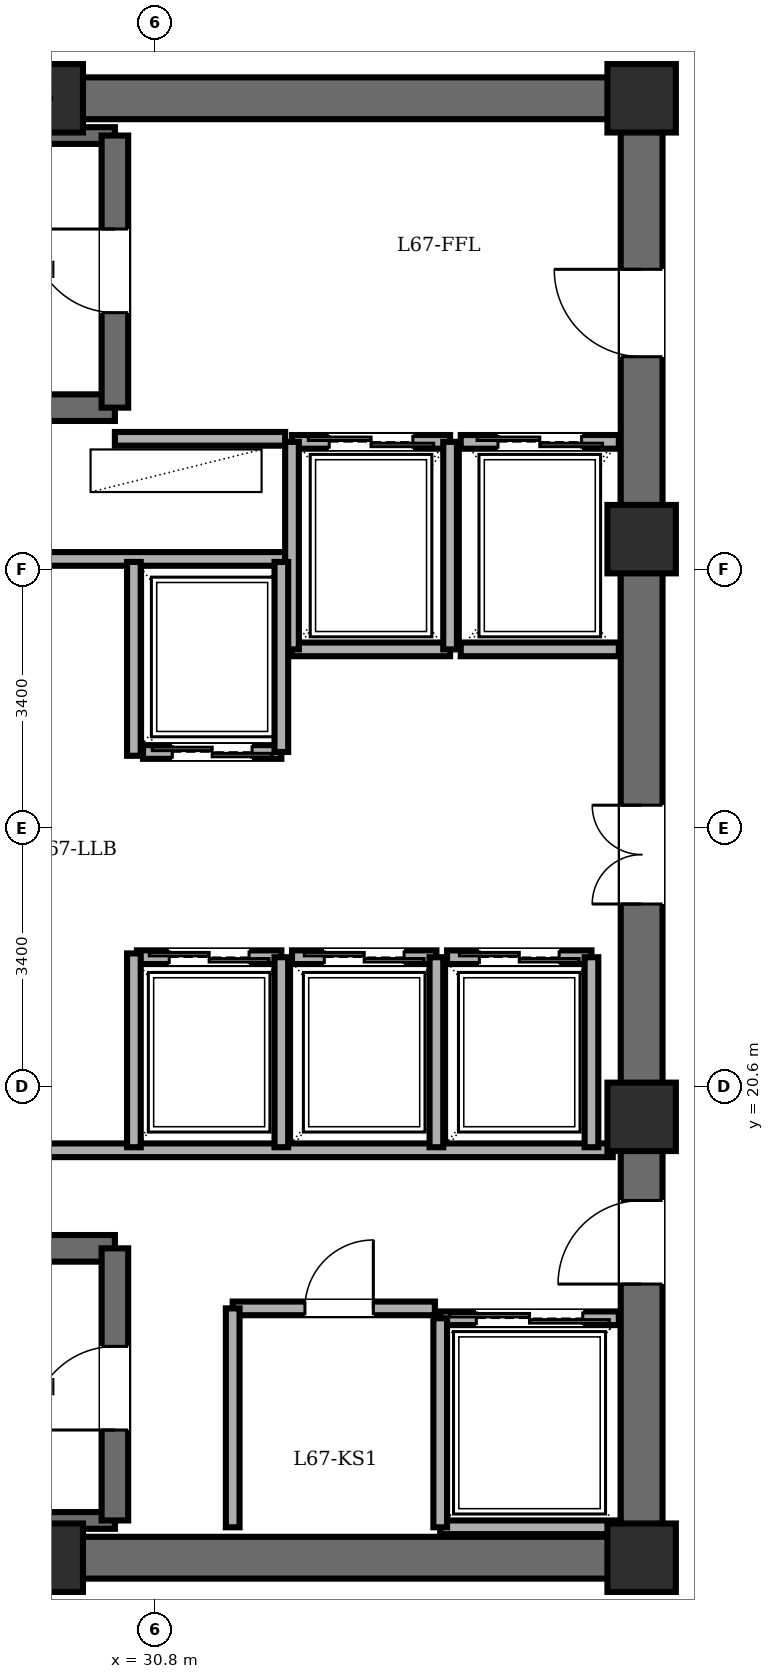
"""IFC4 building model, lengths in metres.
Left out: names, types, materials, properties, quantities, classifications, styles, units other than length and angle.
Written with IfcOpenShell. Run it as: python <this file> out.ifc"""

import sys

from ifc_helpers import new_model, si_unit, direction, frame, frame_2d, origin, origin_2d, place, context, subcontext, project, spatial, rectangle, extrude, element, fill, save


model = new_model("IFC4")
c1 = context("Model", 3, precision=1e-05, world=origin(), true_north=direction((0.0, 1.0)))
c2 = subcontext(c1, "Body", "Model", "MODEL_VIEW")
j1 = project(units=[si_unit("LENGTHUNIT", "METRE"), si_unit("PLANEANGLEUNIT", "RADIAN")], contexts=[c1])
p1 = place(None, origin())
s1 = spatial("IfcSite", under=j1, at=p1, CompositionType="ELEMENT")
p2 = place(p1, origin())
s2 = spatial("IfcBuilding", under=s1, at=p2, CompositionType="ELEMENT")
p3 = place(p2, frame((0.0, 0.0, 258.8)))
s3 = spatial("IfcBuildingStorey", under=s2, at=p3, CompositionType="ELEMENT", Elevation=258.8)
for number, where, z_axis, x_axis in (
    (1, (29.4, 14.4, 0.0), (0.0, 0.0, 1.0), (1.0, 0.0, 0.0)),
    (2, (37.2, 14.4, 0.0), (0.0, 0.0, 1.0), (1.0, 0.0, 0.0)),
    (3, (37.2, 20.2, 0.0), (0.0, 0.0, 1.0), (1.0, 0.0, 0.0)),
    (4, (37.2, 27.8, 0.0), (0.0, 0.0, 1.0), (1.0, 0.0, 0.0)),
    (5, (37.2, 33.6, 0.0), (0.0, 0.0, 1.0), (1.0, 0.0, 0.0)),
    (6, (29.4, 33.6, 0.0), (0.0, 0.0, 1.0), (1.0, 0.0, 0.0)),
):
    element("IfcColumn", number, at=place(p3, frame(where, z_axis=z_axis, x_axis=x_axis)), inside=s3, PredefinedType="COLUMN", context=c2, shape_type="SweptSolid", body=[
        extrude(rectangle(XDim=0.9, YDim=0.9, at=origin_2d()), origin(), (0.0, 0.0, 1.0), 3.65),
    ])
for number, where, z_axis, x_axis in (
    (7, (21.6, 33.6, 0.0), (0.0, 0.0, 1.0), (1.0, 0.0, 0.0)),
    (8, (37.2, 14.4, 0.0), (0.0, 0.0, 1.0), (-1.0, 0.0, 0.0)),
):
    element("IfcWall", number, at=place(p3, frame(where, z_axis=z_axis, x_axis=x_axis)), inside=s3, PredefinedType="SHEAR", context=c2, shape_type="SweptSolid", body=[
        extrude(rectangle(XDim=15.6, YDim=0.55, at=frame_2d((7.8, 0.0))), origin(), (0.0, 0.0, 1.0), 3.45),
    ])
p4 = place(p3, frame((37.2, 14.4, 0.0), z_axis=(0.0, 0.0, 1.0), x_axis=(0.0, 1.0, 0.0)))
e9 = element("IfcWall", 9, at=p4, inside=s3, PredefinedType="SHEAR", context=c2, shape_type="SweptSolid", body=[
    extrude(rectangle(XDim=19.2, YDim=0.55, at=frame_2d((9.6, 0.0))), origin(), (0.0, 0.0, 1.0), 3.45),
])
p5 = place(p4, frame((15.8, 0.0, 0.0)))
e10 = element("IfcOpeningElement", 10, at=p5, cuts=e9, PredefinedType="OPENING", context=c2, shape_type="SweptSolid", body=[
    extrude(rectangle(XDim=1.15, YDim=2.15, at=frame_2d((0.575, 1.075))), frame((0.0, 0.285, 0.0), z_axis=(0.0, -1.0, 0.0), x_axis=(1.0, 0.0, 0.0)), (0.0, 0.0, 1.0), 0.57),
])
p6 = place(p4, frame((3.6, 0.0, 0.0)))
e11 = element("IfcOpeningElement", 11, at=p6, cuts=e9, PredefinedType="OPENING", context=c2, shape_type="SweptSolid", body=[
    extrude(rectangle(XDim=1.1, YDim=2.15, at=frame_2d((0.55, 1.075))), frame((0.0, 0.285, 0.0), z_axis=(0.0, -1.0, 0.0), x_axis=(1.0, 0.0, 0.0)), (0.0, 0.0, 1.0), 0.57),
])
p7 = place(p4, frame((8.6, 0.0, 0.0)))
e12 = element("IfcOpeningElement", 12, at=p7, cuts=e9, PredefinedType="OPENING", context=c2, shape_type="SweptSolid", body=[
    extrude(rectangle(XDim=1.3, YDim=2.2, at=frame_2d((0.65, 1.1))), frame((0.0, 0.285, 0.0), z_axis=(0.0, -1.0, 0.0), x_axis=(1.0, 0.0, 0.0)), (0.0, 0.0, 1.0), 0.57),
])
p8 = place(p3, frame((22.48, 29.53, 0.0), z_axis=(0.0, 0.0, 1.0), x_axis=(1.0, 0.0, 0.0)))
e13 = element("IfcWall", 13, at=p8, inside=s3, PredefinedType="SOLIDWALL", context=c2, shape_type="SweptSolid", body=[
    extrude(rectangle(XDim=7.79, YDim=0.35, at=frame_2d((3.895, 0.0))), origin(), (0.0, 0.0, 1.0), 3.45),
])
p9 = place(p3, frame((22.48, 33.11, 0.0), z_axis=(0.0, 0.0, 1.0), x_axis=(1.0, 0.0, 0.0)))
e14 = element("IfcWall", 14, at=p9, inside=s3, PredefinedType="PARTITIONING", context=c2, shape_type="SweptSolid", body=[
    extrude(rectangle(XDim=7.79, YDim=0.22, at=frame_2d((3.895, 0.0))), origin(), (0.0, 0.0, 1.0), 3.45),
])
p10 = place(p3, frame((30.27, 29.53, 0.0), z_axis=(0.0, 0.0, 1.0), x_axis=(0.0, 1.0, 0.0)))
e15 = element("IfcWall", 15, at=p10, inside=s3, PredefinedType="SOLIDWALL", context=c2, shape_type="SweptSolid", body=[
    extrude(rectangle(XDim=3.58, YDim=0.35, at=frame_2d((1.79, 0.0))), origin(), (0.0, 0.0, 1.0), 3.45),
])
p11 = place(p10, frame((1.25, 0.0, 0.0)))
e16 = element("IfcOpeningElement", 16, at=p11, cuts=e15, PredefinedType="OPENING", context=c2, shape_type="SweptSolid", body=[
    extrude(rectangle(XDim=1.1, YDim=2.15, at=frame_2d((0.55, 1.075))), frame((0.0, 0.185, 0.0), z_axis=(0.0, -1.0, 0.0), x_axis=(1.0, 0.0, 0.0)), (0.0, 0.0, 1.0), 0.37),
])
p12 = place(p3, frame((22.48, 18.47, 0.0), z_axis=(0.0, 0.0, 1.0), x_axis=(1.0, 0.0, 0.0)))
e17 = element("IfcWall", 17, at=p12, inside=s3, PredefinedType="SOLIDWALL", context=c2, shape_type="SweptSolid", body=[
    extrude(rectangle(XDim=7.79, YDim=0.35, at=frame_2d((3.895, 0.0))), origin(), (0.0, 0.0, 1.0), 3.45),
])
p13 = place(p3, frame((22.48, 14.89, 0.0), z_axis=(0.0, 0.0, 1.0), x_axis=(1.0, 0.0, 0.0)))
e18 = element("IfcWall", 18, at=p13, inside=s3, PredefinedType="PARTITIONING", context=c2, shape_type="SweptSolid", body=[
    extrude(rectangle(XDim=7.79, YDim=0.22, at=frame_2d((3.895, 0.0))), origin(), (0.0, 0.0, 1.0), 3.45),
])
p14 = place(p3, frame((30.27, 14.89, 0.0), z_axis=(0.0, 0.0, 1.0), x_axis=(0.0, 1.0, 0.0)))
e19 = element("IfcWall", 19, at=p14, inside=s3, PredefinedType="SOLIDWALL", context=c2, shape_type="SweptSolid", body=[
    extrude(rectangle(XDim=3.58, YDim=0.35, at=frame_2d((1.79, 0.0))), origin(), (0.0, 0.0, 1.0), 3.45),
])
p15 = place(p14, frame((1.19, 0.0, 0.0)))
e20 = element("IfcOpeningElement", 20, at=p15, cuts=e19, PredefinedType="OPENING", context=c2, shape_type="SweptSolid", body=[
    extrude(rectangle(XDim=1.1, YDim=2.15, at=frame_2d((0.55, 1.075))), frame((0.0, 0.185, 0.0), z_axis=(0.0, -1.0, 0.0), x_axis=(1.0, 0.0, 0.0)), (0.0, 0.0, 1.0), 0.37),
])
p16 = place(p3, frame((30.27, 29.12, 0.0), z_axis=(0.0, 0.0, 1.0), x_axis=(1.0, 0.0, 0.0)))
e21 = element("IfcWall", 21, at=p16, inside=s3, PredefinedType="PARTITIONING", context=c2, shape_type="SweptSolid", body=[
    extrude(rectangle(XDim=2.24, YDim=0.18, at=frame_2d((1.12, 0.0))), origin(), (0.0, 0.0, 1.0), 3.45),
])
p17 = place(p3, frame((21.95, 27.54, 0.0), z_axis=(0.0, 0.0, 1.0), x_axis=(1.0, 0.0, 0.0)))
e22 = element("IfcWall", 22, at=p17, inside=s3, PredefinedType="PARTITIONING", context=c2, shape_type="SweptSolid", body=[
    extrude(rectangle(XDim=10.56, YDim=0.18, at=frame_2d((5.28, 0.0))), origin(), (0.0, 0.0, 1.0), 3.45),
])
p18 = place(p3, frame((21.95, 19.76, 0.0), z_axis=(0.0, 0.0, 1.0), x_axis=(1.0, 0.0, 0.0)))
e23 = element("IfcWall", 23, at=p18, inside=s3, PredefinedType="PARTITIONING", context=c2, shape_type="SweptSolid", body=[
    extrude(rectangle(XDim=14.87, YDim=0.18, at=frame_2d((7.435, 0.0))), origin(), (0.0, 0.0, 1.0), 3.45),
])
p19 = place(p3, frame((31.82, 17.68, 0.0), z_axis=(0.0, 0.0, 1.0), x_axis=(1.0, 0.0, 0.0)))
e24 = element("IfcWall", 24, at=p19, inside=s3, PredefinedType="PARTITIONING", context=c2, shape_type="SweptSolid", body=[
    extrude(rectangle(XDim=2.66, YDim=0.18, at=frame_2d((1.33, 0.0))), origin(), (0.0, 0.0, 1.0), 3.45),
])
p20 = place(p19, frame((0.95, 0.0, 0.0)))
e25 = element("IfcOpeningElement", 25, at=p20, cuts=e24, PredefinedType="OPENING", context=c2, shape_type="SweptSolid", body=[
    extrude(rectangle(XDim=0.9, YDim=2.05, at=frame_2d((0.45, 1.025))), frame((0.0, 0.1, 0.0), z_axis=(0.0, -1.0, 0.0), x_axis=(1.0, 0.0, 0.0)), (0.0, 0.0, 1.0), 0.2),
])
p21 = place(p3, frame((31.82, 14.8, 0.0), z_axis=(0.0, 0.0, 1.0), x_axis=(0.0, 1.0, 0.0)))
e26 = element("IfcWall", 26, at=p21, inside=s3, PredefinedType="PARTITIONING", context=c2, shape_type="SweptSolid", body=[
    extrude(rectangle(XDim=2.88, YDim=0.18, at=frame_2d((1.44, 0.0))), origin(), (0.0, 0.0, 1.0), 3.45),
])
p22 = place(p3, frame((32.6, 29.08, 0.0), z_axis=(0.0, 0.0, 1.0), x_axis=(1.0, 0.0, 0.0)))
e27 = element("IfcWall", 27, at=p22, inside=s3, PredefinedType="PARTITIONING", context=c2, shape_type="SweptSolid", body=[
    extrude(rectangle(XDim=2.08, YDim=0.18, at=frame_2d((1.04, 0.0))), origin(), (0.0, 0.0, 1.0), 3.45),
])
p23 = place(p22, frame((0.49, 0.0, 0.0)))
e28 = element("IfcOpeningElement", 28, at=p23, cuts=e27, PredefinedType="OPENING", context=c2, shape_type="SweptSolid", body=[
    extrude(rectangle(XDim=1.1, YDim=2.2, at=frame_2d((0.55, 1.1))), frame((0.0, 0.1, 0.0), z_axis=(0.0, -1.0, 0.0), x_axis=(1.0, 0.0, 0.0)), (0.0, 0.0, 1.0), 0.2),
])
p24 = place(p3, frame((34.68, 26.35, 0.0), z_axis=(0.0, 0.0, 1.0), x_axis=(-1.0, 0.0, 0.0)))
e29 = element("IfcWall", 29, at=p24, inside=s3, PredefinedType="PARTITIONING", context=c2, shape_type="SweptSolid", body=[
    extrude(rectangle(XDim=2.08, YDim=0.18, at=frame_2d((1.04, 0.0))), origin(), (0.0, 0.0, 1.0), 3.45),
])
for number, where, z_axis, x_axis in (
    (30, (34.68, 26.35, 0.0), (0.0, 0.0, 1.0), (0.0, 1.0, 0.0)),
    (31, (32.6, 29.08, 0.0), (0.0, 0.0, 1.0), (0.0, -1.0, 0.0)),
):
    element("IfcWall", number, at=place(p3, frame(where, z_axis=z_axis, x_axis=x_axis)), inside=s3, PredefinedType="PARTITIONING", context=c2, shape_type="SweptSolid", body=[
        extrude(rectangle(XDim=2.73, YDim=0.18, at=frame_2d((1.365, 0.0))), origin(), (0.0, 0.0, 1.0), 3.45),
    ])
p25 = place(p3, frame((34.82, 29.08, 0.0), z_axis=(0.0, 0.0, 1.0), x_axis=(1.0, 0.0, 0.0)))
e32 = element("IfcWall", 32, at=p25, inside=s3, PredefinedType="PARTITIONING", context=c2, shape_type="SweptSolid", body=[
    extrude(rectangle(XDim=2.08, YDim=0.18, at=frame_2d((1.04, 0.0))), origin(), (0.0, 0.0, 1.0), 3.45),
])
p26 = place(p25, frame((0.49, 0.0, 0.0)))
e33 = element("IfcOpeningElement", 33, at=p26, cuts=e32, PredefinedType="OPENING", context=c2, shape_type="SweptSolid", body=[
    extrude(rectangle(XDim=1.1, YDim=2.2, at=frame_2d((0.55, 1.1))), frame((0.0, 0.1, 0.0), z_axis=(0.0, -1.0, 0.0), x_axis=(1.0, 0.0, 0.0)), (0.0, 0.0, 1.0), 0.2),
])
p27 = place(p3, frame((36.9, 26.35, 0.0), z_axis=(0.0, 0.0, 1.0), x_axis=(-1.0, 0.0, 0.0)))
e34 = element("IfcWall", 34, at=p27, inside=s3, PredefinedType="PARTITIONING", context=c2, shape_type="SweptSolid", body=[
    extrude(rectangle(XDim=2.08, YDim=0.18, at=frame_2d((1.04, 0.0))), origin(), (0.0, 0.0, 1.0), 3.45),
])
p28 = place(p3, frame((34.55, 17.55, 0.0), z_axis=(0.0, 0.0, 1.0), x_axis=(1.0, 0.0, 0.0)))
e35 = element("IfcWall", 35, at=p28, inside=s3, PredefinedType="PARTITIONING", context=c2, shape_type="SweptSolid", body=[
    extrude(rectangle(XDim=2.35, YDim=0.18, at=frame_2d((1.175, 0.0))), origin(), (0.0, 0.0, 1.0), 3.45),
])
p29 = place(p28, frame((0.475, 0.0, 0.0)))
e36 = element("IfcOpeningElement", 36, at=p29, cuts=e35, PredefinedType="OPENING", context=c2, shape_type="SweptSolid", body=[
    extrude(rectangle(XDim=1.4, YDim=2.3, at=frame_2d((0.7, 1.15))), frame((0.0, 0.1, 0.0), z_axis=(0.0, -1.0, 0.0), x_axis=(1.0, 0.0, 0.0)), (0.0, 0.0, 1.0), 0.2),
])
p30 = place(p3, frame((36.9, 14.8, 0.0), z_axis=(0.0, 0.0, 1.0), x_axis=(-1.0, 0.0, 0.0)))
e37 = element("IfcWall", 37, at=p30, inside=s3, PredefinedType="PARTITIONING", context=c2, shape_type="SweptSolid", body=[
    extrude(rectangle(XDim=2.35, YDim=0.18, at=frame_2d((1.175, 0.0))), origin(), (0.0, 0.0, 1.0), 3.45),
])
p31 = place(p3, frame((34.55, 17.55, 0.0), z_axis=(0.0, 0.0, 1.0), x_axis=(0.0, -1.0, 0.0)))
e38 = element("IfcWall", 38, at=p31, inside=s3, PredefinedType="PARTITIONING", context=c2, shape_type="SweptSolid", body=[
    extrude(rectangle(XDim=2.75, YDim=0.18, at=frame_2d((1.375, 0.0))), origin(), (0.0, 0.0, 1.0), 3.45),
])
p32 = place(p3, frame((32.46, 25.0, 0.0), z_axis=(0.0, 0.0, 1.0), x_axis=(-1.0, 0.0, 0.0)))
e39 = element("IfcWall", 39, at=p32, inside=s3, PredefinedType="PARTITIONING", context=c2, shape_type="SweptSolid", body=[
    extrude(rectangle(XDim=1.82, YDim=0.18, at=frame_2d((0.91, 0.0))), origin(), (0.0, 0.0, 1.0), 3.45),
])
p33 = place(p32, frame((0.385, 0.0, 0.0)))
e40 = element("IfcOpeningElement", 40, at=p33, cuts=e39, PredefinedType="OPENING", context=c2, shape_type="SweptSolid", body=[
    extrude(rectangle(XDim=1.05, YDim=2.2, at=frame_2d((0.525, 1.1))), frame((0.0, 0.1, 0.0), z_axis=(0.0, -1.0, 0.0), x_axis=(1.0, 0.0, 0.0)), (0.0, 0.0, 1.0), 0.2),
])
p34 = place(p3, frame((32.46, 25.0, 0.0), z_axis=(0.0, 0.0, 1.0), x_axis=(0.0, 1.0, 0.0)))
e41 = element("IfcWall", 41, at=p34, inside=s3, PredefinedType="PARTITIONING", context=c2, shape_type="SweptSolid", body=[
    extrude(rectangle(XDim=2.5, YDim=0.18, at=frame_2d((1.25, 0.0))), origin(), (0.0, 0.0, 1.0), 3.45),
])
p35 = place(p3, frame((30.56, 22.3, 0.0), z_axis=(0.0, 0.0, 1.0), x_axis=(1.0, 0.0, 0.0)))
e42 = element("IfcWall", 42, at=p35, inside=s3, PredefinedType="PARTITIONING", context=c2, shape_type="SweptSolid", body=[
    extrude(rectangle(XDim=1.9, YDim=0.18, at=frame_2d((0.95, 0.0))), origin(), (0.0, 0.0, 1.0), 3.45),
])
p36 = place(p35, frame((0.425, 0.0, 0.0)))
e43 = element("IfcOpeningElement", 43, at=p36, cuts=e42, PredefinedType="OPENING", context=c2, shape_type="SweptSolid", body=[
    extrude(rectangle(XDim=1.05, YDim=2.2, at=frame_2d((0.525, 1.1))), frame((0.0, 0.1, 0.0), z_axis=(0.0, -1.0, 0.0), x_axis=(1.0, 0.0, 0.0)), (0.0, 0.0, 1.0), 0.2),
])
p37 = place(p3, frame((32.46, 19.8, 0.0), z_axis=(0.0, 0.0, 1.0), x_axis=(0.0, 1.0, 0.0)))
e44 = element("IfcWall", 44, at=p37, inside=s3, PredefinedType="PARTITIONING", context=c2, shape_type="SweptSolid", body=[
    extrude(rectangle(XDim=2.5, YDim=0.18, at=frame_2d((1.25, 0.0))), origin(), (0.0, 0.0, 1.0), 3.45),
])
p38 = place(p3, frame((32.6, 22.3, 0.0), z_axis=(0.0, 0.0, 1.0), x_axis=(1.0, 0.0, 0.0)))
e45 = element("IfcWall", 45, at=p38, inside=s3, PredefinedType="PARTITIONING", context=c2, shape_type="SweptSolid", body=[
    extrude(rectangle(XDim=1.9, YDim=0.18, at=frame_2d((0.95, 0.0))), origin(), (0.0, 0.0, 1.0), 3.45),
])
p39 = place(p38, frame((0.425, 0.0, 0.0)))
e46 = element("IfcOpeningElement", 46, at=p39, cuts=e45, PredefinedType="OPENING", context=c2, shape_type="SweptSolid", body=[
    extrude(rectangle(XDim=1.05, YDim=2.2, at=frame_2d((0.525, 1.1))), frame((0.0, 0.1, 0.0), z_axis=(0.0, -1.0, 0.0), x_axis=(1.0, 0.0, 0.0)), (0.0, 0.0, 1.0), 0.2),
])
p40 = place(p3, frame((34.5, 19.8, 0.0), z_axis=(0.0, 0.0, 1.0), x_axis=(0.0, 1.0, 0.0)))
e47 = element("IfcWall", 47, at=p40, inside=s3, PredefinedType="PARTITIONING", context=c2, shape_type="SweptSolid", body=[
    extrude(rectangle(XDim=2.5, YDim=0.18, at=frame_2d((1.25, 0.0))), origin(), (0.0, 0.0, 1.0), 3.45),
])
p41 = place(p3, frame((34.64, 22.3, 0.0), z_axis=(0.0, 0.0, 1.0), x_axis=(1.0, 0.0, 0.0)))
e48 = element("IfcWall", 48, at=p41, inside=s3, PredefinedType="PARTITIONING", context=c2, shape_type="SweptSolid", body=[
    extrude(rectangle(XDim=1.9, YDim=0.18, at=frame_2d((0.95, 0.0))), origin(), (0.0, 0.0, 1.0), 3.45),
])
p42 = place(p41, frame((0.425, 0.0, 0.0)))
e49 = element("IfcOpeningElement", 49, at=p42, cuts=e48, PredefinedType="OPENING", context=c2, shape_type="SweptSolid", body=[
    extrude(rectangle(XDim=1.05, YDim=2.2, at=frame_2d((0.525, 1.1))), frame((0.0, 0.1, 0.0), z_axis=(0.0, -1.0, 0.0), x_axis=(1.0, 0.0, 0.0)), (0.0, 0.0, 1.0), 0.2),
])
p43 = place(p3, frame((36.54, 19.8, 0.0), z_axis=(0.0, 0.0, 1.0), x_axis=(0.0, 1.0, 0.0)))
e50 = element("IfcWall", 50, at=p43, inside=s3, PredefinedType="PARTITIONING", context=c2, shape_type="SweptSolid", body=[
    extrude(rectangle(XDim=2.5, YDim=0.18, at=frame_2d((1.25, 0.0))), origin(), (0.0, 0.0, 1.0), 3.45),
])
for number, where, z_axis, x_axis in (
    (51, (30.52, 24.95, 0.0), (0.0, 0.0, 1.0), (0.0, 1.0, 0.0)),
    (52, (30.52, 19.8, 0.0), (0.0, 0.0, 1.0), (0.0, 1.0, 0.0)),
):
    element("IfcWall", number, at=place(p3, frame(where, z_axis=z_axis, x_axis=x_axis)), inside=s3, PredefinedType="PARTITIONING", context=c2, shape_type="SweptSolid", body=[
        extrude(rectangle(XDim=2.55, YDim=0.18, at=frame_2d((1.275, 0.0))), origin(), (0.0, 0.0, 1.0), 3.45),
    ])
p44 = place(p11, origin())
e53 = element("IfcDoor", 53, at=p44, inside=s3, OperationType="SINGLE_SWING_RIGHT", PredefinedType="DOOR", context=c2, shape_type="SweptSolid", body=[
    extrude(rectangle(XDim=1.1, YDim=2.15, at=frame_2d((0.55, 1.075))), frame((0.0, 0.025, 0.0), z_axis=(0.0, -1.0, 0.0), x_axis=(1.0, 0.0, 0.0)), (0.0, 0.0, 1.0), 0.05),
])
fill(e16, e53)
p45 = place(p15, origin())
e54 = element("IfcDoor", 54, at=p45, inside=s3, OperationType="SINGLE_SWING_LEFT", PredefinedType="DOOR", context=c2, shape_type="SweptSolid", body=[
    extrude(rectangle(XDim=1.1, YDim=2.15, at=frame_2d((0.55, 1.075))), frame((0.0, 0.025, 0.0), z_axis=(0.0, -1.0, 0.0), x_axis=(1.0, 0.0, 0.0)), (0.0, 0.0, 1.0), 0.05),
])
fill(e20, e54)
p46 = place(p5, origin())
e55 = element("IfcDoor", 55, at=p46, inside=s3, OperationType="SINGLE_SWING_RIGHT", PredefinedType="DOOR", context=c2, shape_type="SweptSolid", body=[
    extrude(rectangle(XDim=1.15, YDim=2.15, at=frame_2d((0.575, 1.075))), frame((0.0, 0.025, 0.0), z_axis=(0.0, -1.0, 0.0), x_axis=(1.0, 0.0, 0.0)), (0.0, 0.0, 1.0), 0.05),
])
fill(e10, e55)
p47 = place(p6, origin())
e56 = element("IfcDoor", 56, at=p47, inside=s3, OperationType="SINGLE_SWING_LEFT", PredefinedType="DOOR", context=c2, shape_type="SweptSolid", body=[
    extrude(rectangle(XDim=1.1, YDim=2.15, at=frame_2d((0.55, 1.075))), frame((0.0, 0.025, 0.0), z_axis=(0.0, -1.0, 0.0), x_axis=(1.0, 0.0, 0.0)), (0.0, 0.0, 1.0), 0.05),
])
fill(e11, e56)
p48 = place(p20, origin())
e57 = element("IfcDoor", 57, at=p48, inside=s3, OperationType="SINGLE_SWING_RIGHT", PredefinedType="DOOR", context=c2, shape_type="SweptSolid", body=[
    extrude(rectangle(XDim=0.9, YDim=2.05, at=frame_2d((0.45, 1.025))), frame((0.0, 0.025, 0.0), z_axis=(0.0, -1.0, 0.0), x_axis=(1.0, 0.0, 0.0)), (0.0, 0.0, 1.0), 0.05),
])
fill(e25, e57)
p49 = place(p23, origin())
e58 = element("IfcDoor", 58, at=p49, inside=s3, OperationType="DOUBLE_DOOR_SLIDING", PredefinedType="DOOR", context=c2, shape_type="SweptSolid", body=[
    extrude(rectangle(XDim=1.1, YDim=2.2, at=frame_2d((0.55, 1.1))), frame((0.0, 0.025, 0.0), z_axis=(0.0, -1.0, 0.0), x_axis=(1.0, 0.0, 0.0)), (0.0, 0.0, 1.0), 0.05),
])
fill(e28, e58)
p50 = place(p26, origin())
e59 = element("IfcDoor", 59, at=p50, inside=s3, OperationType="DOUBLE_DOOR_SLIDING", PredefinedType="DOOR", context=c2, shape_type="SweptSolid", body=[
    extrude(rectangle(XDim=1.1, YDim=2.2, at=frame_2d((0.55, 1.1))), frame((0.0, 0.025, 0.0), z_axis=(0.0, -1.0, 0.0), x_axis=(1.0, 0.0, 0.0)), (0.0, 0.0, 1.0), 0.05),
])
fill(e33, e59)
p51 = place(p29, origin())
e60 = element("IfcDoor", 60, at=p51, inside=s3, OperationType="DOUBLE_DOOR_SLIDING", PredefinedType="DOOR", context=c2, shape_type="SweptSolid", body=[
    extrude(rectangle(XDim=1.4, YDim=2.3, at=frame_2d((0.7, 1.15))), frame((0.0, 0.025, 0.0), z_axis=(0.0, -1.0, 0.0), x_axis=(1.0, 0.0, 0.0)), (0.0, 0.0, 1.0), 0.05),
])
fill(e36, e60)
p52 = place(p33, origin())
e61 = element("IfcDoor", 61, at=p52, inside=s3, OperationType="DOUBLE_DOOR_SLIDING", PredefinedType="DOOR", context=c2, shape_type="SweptSolid", body=[
    extrude(rectangle(XDim=1.05, YDim=2.2, at=frame_2d((0.525, 1.1))), frame((0.0, 0.025, 0.0), z_axis=(0.0, -1.0, 0.0), x_axis=(1.0, 0.0, 0.0)), (0.0, 0.0, 1.0), 0.05),
])
fill(e40, e61)
p53 = place(p36, origin())
e62 = element("IfcDoor", 62, at=p53, inside=s3, OperationType="DOUBLE_DOOR_SLIDING", PredefinedType="DOOR", context=c2, shape_type="SweptSolid", body=[
    extrude(rectangle(XDim=1.05, YDim=2.2, at=frame_2d((0.525, 1.1))), frame((0.0, 0.025, 0.0), z_axis=(0.0, -1.0, 0.0), x_axis=(1.0, 0.0, 0.0)), (0.0, 0.0, 1.0), 0.05),
])
fill(e43, e62)
p54 = place(p39, origin())
e63 = element("IfcDoor", 63, at=p54, inside=s3, OperationType="DOUBLE_DOOR_SLIDING", PredefinedType="DOOR", context=c2, shape_type="SweptSolid", body=[
    extrude(rectangle(XDim=1.05, YDim=2.2, at=frame_2d((0.525, 1.1))), frame((0.0, 0.025, 0.0), z_axis=(0.0, -1.0, 0.0), x_axis=(1.0, 0.0, 0.0)), (0.0, 0.0, 1.0), 0.05),
])
fill(e46, e63)
p55 = place(p42, origin())
e64 = element("IfcDoor", 64, at=p55, inside=s3, OperationType="DOUBLE_DOOR_SLIDING", PredefinedType="DOOR", context=c2, shape_type="SweptSolid", body=[
    extrude(rectangle(XDim=1.05, YDim=2.2, at=frame_2d((0.525, 1.1))), frame((0.0, 0.025, 0.0), z_axis=(0.0, -1.0, 0.0), x_axis=(1.0, 0.0, 0.0)), (0.0, 0.0, 1.0), 0.05),
])
fill(e49, e64)
p56 = place(p7, origin())
e65 = element("IfcDoor", 65, at=p56, inside=s3, OperationType="DOUBLE_DOOR_SINGLE_SWING", PredefinedType="DOOR", context=c2, shape_type="SweptSolid", body=[
    extrude(rectangle(XDim=1.3, YDim=2.2, at=frame_2d((0.65, 1.1))), frame((0.0, 0.025, 0.0), z_axis=(0.0, -1.0, 0.0), x_axis=(1.0, 0.0, 0.0)), (0.0, 0.0, 1.0), 0.05),
])
fill(e12, e65)
save(model, sys.argv[1])
